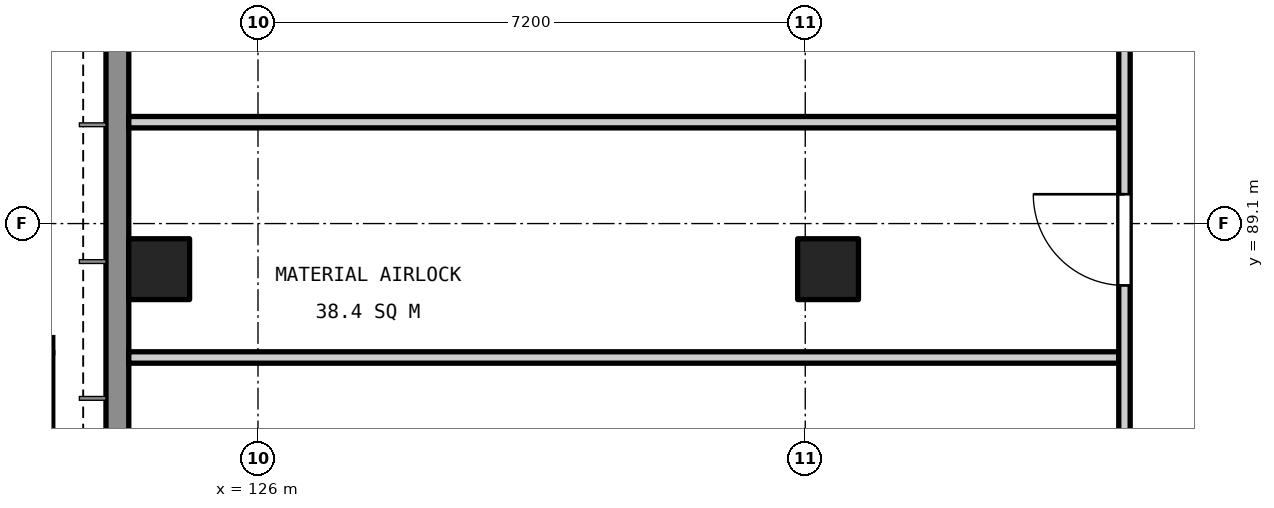
"""IFC4 building model, lengths in metres.
Left out: names, types, materials, properties, quantities, classifications, styles, units other than length and angle.
Written with IfcOpenShell. Run it as: python <this file> out.ifc"""

import sys

from ifc_helpers import new_model, si_unit, direction, frame, frame_2d, origin, origin_2d, place, context, subcontext, project, spatial, rectangle, extrude, element, fill, save


model = new_model("IFC4")
c1 = context("Model", 3, precision=1e-05, world=origin(), true_north=direction((0.0, 1.0)))
c2 = subcontext(c1, "Body", "Model", "MODEL_VIEW")
j1 = project(units=[si_unit("LENGTHUNIT", "METRE"), si_unit("PLANEANGLEUNIT", "RADIAN")], contexts=[c1])
p1 = place(None, origin())
s1 = spatial("IfcSite", under=j1, at=p1, CompositionType="ELEMENT")
p2 = place(p1, origin())
s2 = spatial("IfcBuilding", under=s1, at=p2, CompositionType="ELEMENT")
p3 = place(p2, origin())
s3 = spatial("IfcBuildingStorey", under=s2, at=p3, CompositionType="ELEMENT", Elevation=0.0)
for number, where, z_axis, x_axis in (
    (1, (124.7, 88.5, 0.0), (0.0, 0.0, 1.0), (1.0, 0.0, 0.0)),
    (2, (133.5, 88.5, 0.0), (0.0, 0.0, 1.0), (1.0, 0.0, 0.0)),
):
    element("IfcColumn", number, at=place(p3, frame(where, z_axis=z_axis, x_axis=x_axis)), inside=s3, PredefinedType="COLUMN", context=c2, shape_type="SweptSolid", body=[
        extrude(rectangle(XDim=0.8, YDim=0.8, at=origin_2d()), origin(), (0.0, 0.0, 1.0), 6.0),
    ])
p4 = place(p3, frame((124.15, 70.3, 0.0), z_axis=(0.0, 0.0, 1.0), x_axis=(0.0, 1.0, 0.0)))
e3 = element("IfcWall", 3, at=p4, inside=s3, PredefinedType="SOLIDWALL", context=c2, shape_type="SweptSolid", body=[
    extrude(rectangle(XDim=36.5, YDim=0.3, at=frame_2d((18.25, 0.0))), origin(), (0.0, 0.0, 1.0), 5.55),
])
p5 = place(p4, frame((27.55, 0.0, 0.0)))
e4 = element("IfcOpeningElement", 4, at=p5, cuts=e3, PredefinedType="OPENING", context=c2, shape_type="SweptSolid", body=[
    extrude(rectangle(XDim=1.5, YDim=2.4, at=frame_2d((0.75, 1.2))), frame((0.0, 0.16, 0.0), z_axis=(0.0, -1.0, 0.0), x_axis=(1.0, 0.0, 0.0)), (0.0, 0.0, 1.0), 0.32),
])
for number, where, z_axis, x_axis in (
    (5, (124.3, 87.338, 0.0), (0.0, 0.0, 1.0), (1.0, 0.0, 0.0)),
    (6, (124.3, 90.434, 0.0), (0.0, 0.0, 1.0), (1.0, 0.0, 0.0)),
):
    element("IfcWall", number, at=place(p3, frame(where, z_axis=z_axis, x_axis=x_axis)), inside=s3, PredefinedType="SOLIDWALL", context=c2, shape_type="SweptSolid", body=[
        extrude(rectangle(XDim=13.025, YDim=0.15, at=frame_2d((6.512, 0.0))), origin(), (0.0, 0.0, 1.0), 5.55),
    ])
p6 = place(p3, frame((137.4, 79.7, 0.0), z_axis=(0.0, 0.0, 1.0), x_axis=(0.0, 1.0, 0.0)))
e7 = element("IfcWall", 7, at=p6, inside=s3, PredefinedType="SOLIDWALL", context=c2, shape_type="SweptSolid", body=[
    extrude(rectangle(XDim=17.7, YDim=0.15, at=frame_2d((8.85, 0.0))), origin(), (0.0, 0.0, 1.0), 5.55),
])
p7 = place(p6, frame((0.8, 0.0, 0.0)))
e8 = element("IfcOpeningElement", 8, at=p7, cuts=e7, PredefinedType="OPENING", context=c2, shape_type="SweptSolid", body=[
    extrude(rectangle(XDim=1.2, YDim=2.1, at=frame_2d((0.6, 1.05))), frame((0.0, 0.085, 0.0), z_axis=(0.0, -1.0, 0.0), x_axis=(1.0, 0.0, 0.0)), (0.0, 0.0, 1.0), 0.17),
])
p8 = place(p6, frame((4.619, 0.0, 0.0)))
e9 = element("IfcOpeningElement", 9, at=p8, cuts=e7, PredefinedType="OPENING", context=c2, shape_type="SweptSolid", body=[
    extrude(rectangle(XDim=1.2, YDim=2.1, at=frame_2d((0.6, 1.05))), frame((0.0, 0.085, 0.0), z_axis=(0.0, -1.0, 0.0), x_axis=(1.0, 0.0, 0.0)), (0.0, 0.0, 1.0), 0.17),
])
p9 = place(p6, frame((8.586, 0.0, 0.0)))
e10 = element("IfcOpeningElement", 10, at=p9, cuts=e7, PredefinedType="OPENING", context=c2, shape_type="SweptSolid", body=[
    extrude(rectangle(XDim=1.2, YDim=2.1, at=frame_2d((0.6, 1.05))), frame((0.0, 0.085, 0.0), z_axis=(0.0, -1.0, 0.0), x_axis=(1.0, 0.0, 0.0)), (0.0, 0.0, 1.0), 0.17),
])
p10 = place(p6, frame((13.617, 0.0, 0.0)))
e11 = element("IfcOpeningElement", 11, at=p10, cuts=e7, PredefinedType="OPENING", context=c2, shape_type="SweptSolid", body=[
    extrude(rectangle(XDim=1.2, YDim=2.1, at=frame_2d((0.6, 1.05))), frame((0.0, 0.085, 0.0), z_axis=(0.0, -1.0, 0.0), x_axis=(1.0, 0.0, 0.0)), (0.0, 0.0, 1.0), 0.17),
])
p11 = place(p3, frame((119.1, 87.5, 0.0), z_axis=(0.0, 0.0, 1.0), x_axis=(1.0, 0.0, 0.0)))
e12 = element("IfcWall", 12, at=p11, inside=s3, PredefinedType="SOLIDWALL", context=c2, shape_type="SweptSolid", body=[
    extrude(rectangle(XDim=4.2, YDim=0.2, at=frame_2d((2.1, 0.0))), origin(), (0.0, 0.0, 1.0), 3.3),
])
p12 = place(p11, frame((1.4, 0.0, 0.0)))
e13 = element("IfcOpeningElement", 13, at=p12, cuts=e12, PredefinedType="OPENING", context=c2, shape_type="SweptSolid", body=[
    extrude(rectangle(XDim=1.4, YDim=2.1, at=frame_2d((0.7, 1.05))), frame((0.0, 0.11, 0.0), z_axis=(0.0, -1.0, 0.0), x_axis=(1.0, 0.0, 0.0)), (0.0, 0.0, 1.0), 0.22),
])
p13 = place(p9, origin())
e14 = element("IfcDoor", 14, at=p13, inside=s3, OperationType="SINGLE_SWING_RIGHT", PredefinedType="DOOR", context=c2, shape_type="SweptSolid", body=[
    extrude(rectangle(XDim=1.2, YDim=2.1, at=frame_2d((0.6, 1.05))), frame((0.0, 0.025, 0.0), z_axis=(0.0, -1.0, 0.0), x_axis=(1.0, 0.0, 0.0)), (0.0, 0.0, 1.0), 0.05),
])
fill(e10, e14)
save(model, sys.argv[1])
